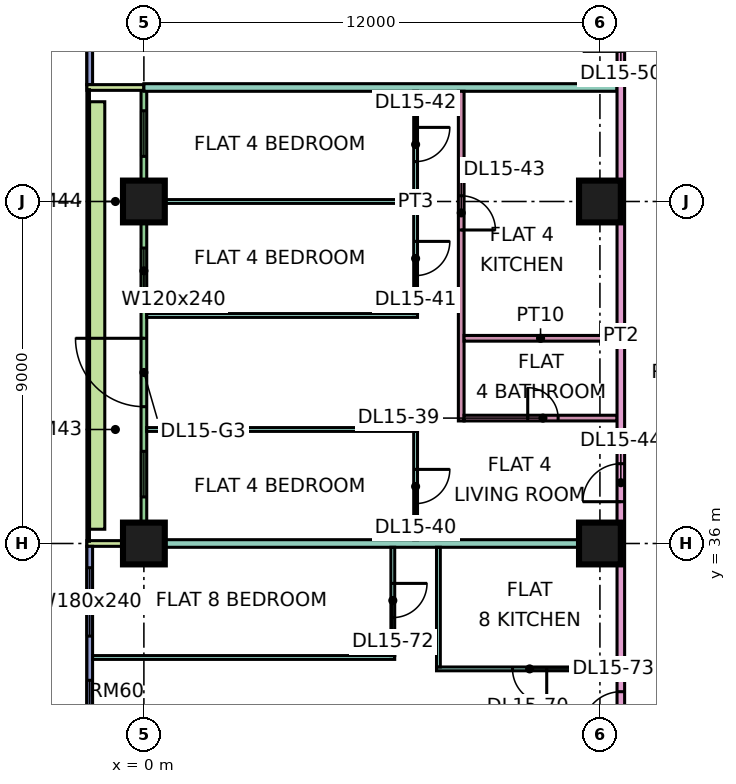
"""IFC4 building model, lengths in metres.
Left out: names, types, materials, properties, quantities, classifications, styles, units other than length and angle.
Written with IfcOpenShell. Run it as: python <this file> out.ifc"""

import sys

from ifc_helpers import new_model, si_unit, direction, frame, frame_2d, origin, origin_2d, place, context, subcontext, project, spatial, rectangle, extrude, element, fill, save


model = new_model("IFC4")
c1 = context("Model", 3, precision=1e-05, world=origin(), true_north=direction((0.0, 1.0)))
c2 = subcontext(c1, "Body", "Model", "MODEL_VIEW")
j1 = project(units=[si_unit("LENGTHUNIT", "METRE"), si_unit("PLANEANGLEUNIT", "RADIAN")], contexts=[c1])
p1 = place(None, origin())
s1 = spatial("IfcSite", under=j1, at=p1, CompositionType="ELEMENT")
p2 = place(p1, origin())
s2 = spatial("IfcBuilding", under=s1, at=p2, CompositionType="ELEMENT")
p3 = place(p2, frame((0.0, 0.0, 71.4)))
s3 = spatial("IfcBuildingStorey", under=s2, at=p3, CompositionType="ELEMENT", Elevation=71.4)
p4 = place(p3, frame((0.0, 36.0, 0.0), z_axis=(0.0, 0.0, 1.0), x_axis=(1.0, 0.0, 0.0)))
e1 = element("IfcColumn", 1, at=p4, inside=s3, PredefinedType="COLUMN", context=c2, shape_type="SweptSolid", body=[
    extrude(rectangle(XDim=1.1, YDim=1.1, at=origin_2d()), origin(), (0.0, 0.0, 1.0), 3.75),
])
for number, where, z_axis, x_axis in (
    (2, (0.0, 45.0, 0.0), (0.0, 0.0, 1.0), (1.0, 0.0, 0.0)),
    (3, (12.0, 36.0, 0.0), (0.0, 0.0, 1.0), (1.0, 0.0, 0.0)),
    (4, (12.0, 45.0, 0.0), (0.0, 0.0, 1.0), (1.0, 0.0, 0.0)),
):
    element("IfcColumn", number, at=place(p3, frame(where, z_axis=z_axis, x_axis=x_axis)), inside=s3, PredefinedType="COLUMN", context=c2, shape_type="SweptSolid", body=[
        extrude(rectangle(XDim=1.1, YDim=1.1, at=origin_2d()), origin(), (0.0, 0.0, 1.0), 3.75),
    ])
p5 = place(p3, frame((-1.425, 61.5, 0.0), z_axis=(0.0, 0.0, 1.0), x_axis=(0.0, -1.0, 0.0)))
e5 = element("IfcWall", 5, at=p5, inside=s3, PredefinedType="SOLIDWALL", context=c2, shape_type="SweptSolid", body=[
    extrude(rectangle(XDim=13.425, YDim=0.15, at=frame_2d((6.712, 0.0))), origin(), (0.0, 0.0, 1.0), 3.35),
])
p6 = place(p5, frame((0.3, 0.0, 0.45)))
e6 = element("IfcOpeningElement", 6, at=p6, cuts=e5, PredefinedType="OPENING", context=c2, shape_type="SweptSolid", body=[
    extrude(rectangle(XDim=0.9, YDim=2.4, at=frame_2d((0.45, 1.2))), frame((0.0, 0.085, 0.0), z_axis=(0.0, -1.0, 0.0), x_axis=(1.0, 0.0, 0.0)), (0.0, 0.0, 1.0), 0.17),
])
p7 = place(p5, frame((2.1, 0.0, 0.45)))
e7 = element("IfcOpeningElement", 7, at=p7, cuts=e5, PredefinedType="OPENING", context=c2, shape_type="SweptSolid", body=[
    extrude(rectangle(XDim=1.8, YDim=2.4, at=frame_2d((0.9, 1.2))), frame((0.0, 0.085, 0.0), z_axis=(0.0, -1.0, 0.0), x_axis=(1.0, 0.0, 0.0)), (0.0, 0.0, 1.0), 0.17),
])
p8 = place(p5, frame((5.1, 0.0, 0.45)))
e8 = element("IfcOpeningElement", 8, at=p8, cuts=e5, PredefinedType="OPENING", context=c2, shape_type="SweptSolid", body=[
    extrude(rectangle(XDim=1.8, YDim=2.4, at=frame_2d((0.9, 1.2))), frame((0.0, 0.085, 0.0), z_axis=(0.0, -1.0, 0.0), x_axis=(1.0, 0.0, 0.0)), (0.0, 0.0, 1.0), 0.17),
])
p9 = place(p5, frame((8.962, 0.0, 0.45)))
e9 = element("IfcOpeningElement", 9, at=p9, cuts=e5, PredefinedType="OPENING", context=c2, shape_type="SweptSolid", body=[
    extrude(rectangle(XDim=3.0, YDim=2.4, at=frame_2d((1.5, 1.2))), frame((0.0, 0.085, 0.0), z_axis=(0.0, -1.0, 0.0), x_axis=(1.0, 0.0, 0.0)), (0.0, 0.0, 1.0), 0.17),
])
p10 = place(p3, frame((0.0, 47.925, 0.0), z_axis=(0.0, 0.0, 1.0), x_axis=(0.0, -1.0, 0.0)))
e10 = element("IfcWall", 10, at=p10, inside=s3, PredefinedType="SOLIDWALL", context=c2, shape_type="SweptSolid", body=[
    extrude(rectangle(XDim=11.85, YDim=0.15, at=frame_2d((5.925, 0.0))), origin(), (0.0, 0.0, 1.0), 3.35),
])
p11 = place(p10, frame((0.538, 0.0, 0.45)))
e11 = element("IfcOpeningElement", 11, at=p11, cuts=e10, PredefinedType="OPENING", context=c2, shape_type="SweptSolid", body=[
    extrude(rectangle(XDim=1.2, YDim=2.4, at=frame_2d((0.6, 1.2))), frame((0.0, 0.085, 0.0), z_axis=(0.0, -1.0, 0.0), x_axis=(1.0, 0.0, 0.0)), (0.0, 0.0, 1.0), 0.17),
])
p12 = place(p10, frame((4.15, 0.0, 0.45)))
e12 = element("IfcOpeningElement", 12, at=p12, cuts=e10, PredefinedType="OPENING", context=c2, shape_type="SweptSolid", body=[
    extrude(rectangle(XDim=1.2, YDim=2.4, at=frame_2d((0.6, 1.2))), frame((0.0, 0.085, 0.0), z_axis=(0.0, -1.0, 0.0), x_axis=(1.0, 0.0, 0.0)), (0.0, 0.0, 1.0), 0.17),
])
p13 = place(p10, frame((6.525, 0.0, 0.0)))
e13 = element("IfcOpeningElement", 13, at=p13, cuts=e10, PredefinedType="OPENING", context=c2, shape_type="SweptSolid", body=[
    extrude(rectangle(XDim=1.8, YDim=2.4, at=frame_2d((0.9, 1.2))), frame((0.0, 0.085, 0.0), z_axis=(0.0, -1.0, 0.0), x_axis=(1.0, 0.0, 0.0)), (0.0, 0.0, 1.0), 0.17),
])
p14 = place(p10, frame((9.5, 0.0, 0.45)))
e14 = element("IfcOpeningElement", 14, at=p14, cuts=e10, PredefinedType="OPENING", context=c2, shape_type="SweptSolid", body=[
    extrude(rectangle(XDim=1.2, YDim=2.4, at=frame_2d((0.6, 1.2))), frame((0.0, 0.085, 0.0), z_axis=(0.0, -1.0, 0.0), x_axis=(1.0, 0.0, 0.0)), (0.0, 0.0, 1.0), 0.17),
])
for number, where, z_axis, x_axis in (
    (15, (-1.5, 48.0, 0.0), (0.0, 0.0, 1.0), (1.0, 0.0, 0.0)),
    (16, (-1.5, 36.0, 0.0), (0.0, 0.0, 1.0), (1.0, 0.0, 0.0)),
):
    element("IfcWall", number, at=place(p3, frame(where, z_axis=z_axis, x_axis=x_axis)), inside=s3, PredefinedType="SOLIDWALL", context=c2, shape_type="SweptSolid", body=[
        extrude(rectangle(XDim=1.5, YDim=0.15, at=frame_2d((0.75, 0.0))), origin(), (0.0, 0.0, 1.0), 3.35),
    ])
p15 = place(p3, frame((-1.425, 35.925, 0.0), z_axis=(0.0, 0.0, 1.0), x_axis=(0.0, -1.0, 0.0)))
e17 = element("IfcWall", 17, at=p15, inside=s3, PredefinedType="SOLIDWALL", context=c2, shape_type="SweptSolid", body=[
    extrude(rectangle(XDim=11.85, YDim=0.15, at=frame_2d((5.925, 0.0))), origin(), (0.0, 0.0, 1.0), 3.35),
])
p16 = place(p15, frame((0.562, 0.0, 0.45)))
e18 = element("IfcOpeningElement", 18, at=p16, cuts=e17, PredefinedType="OPENING", context=c2, shape_type="SweptSolid", body=[
    extrude(rectangle(XDim=1.8, YDim=2.4, at=frame_2d((0.9, 1.2))), frame((0.0, 0.085, 0.0), z_axis=(0.0, -1.0, 0.0), x_axis=(1.0, 0.0, 0.0)), (0.0, 0.0, 1.0), 0.17),
])
p17 = place(p15, frame((3.525, 0.0, 0.45)))
e19 = element("IfcOpeningElement", 19, at=p17, cuts=e17, PredefinedType="OPENING", context=c2, shape_type="SweptSolid", body=[
    extrude(rectangle(XDim=4.8, YDim=2.4, at=frame_2d((2.4, 1.2))), frame((0.0, 0.085, 0.0), z_axis=(0.0, -1.0, 0.0), x_axis=(1.0, 0.0, 0.0)), (0.0, 0.0, 1.0), 0.17),
])
p18 = place(p15, frame((9.488, 0.0, 0.45)))
e20 = element("IfcOpeningElement", 20, at=p18, cuts=e17, PredefinedType="OPENING", context=c2, shape_type="SweptSolid", body=[
    extrude(rectangle(XDim=1.8, YDim=2.4, at=frame_2d((0.9, 1.2))), frame((0.0, 0.085, 0.0), z_axis=(0.0, -1.0, 0.0), x_axis=(1.0, 0.0, 0.0)), (0.0, 0.0, 1.0), 0.17),
])
p19 = place(p3, frame((-1.229, 47.625, 0.0), z_axis=(0.0, 0.0, 1.0), x_axis=(0.0, -1.0, 0.0)))
e21 = element("IfcWall", 21, at=p19, inside=s3, PredefinedType="SOLIDWALL", context=c2, shape_type="SweptSolid", body=[
    extrude(rectangle(XDim=11.25, YDim=0.4, at=frame_2d((5.625, 0.0))), origin(), (0.0, 0.0, 1.0), 0.7),
])
p20 = place(p3, frame((-1.35, 33.0, 0.0), z_axis=(0.0, 0.0, 1.0), x_axis=(1.0, 0.0, 0.0)))
e22 = element("IfcWall", 22, at=p20, inside=s3, PredefinedType="PARTITIONING", context=c2, shape_type="SweptSolid", body=[
    extrude(rectangle(XDim=7.95, YDim=0.1, at=frame_2d((3.975, 0.0))), origin(), (0.0, 0.0, 1.0), 3.35),
])
e23 = element("IfcWall", 23, at=p4, inside=s3, PredefinedType="PARTITIONING", context=c2, shape_type="SweptSolid", body=[
    extrude(rectangle(XDim=12.45, YDim=0.2, at=frame_2d((6.225, 0.0))), origin(), (0.0, 0.0, 1.0), 3.35),
])
p21 = place(p3, frame((0.0, 48.0, 0.0), z_axis=(0.0, 0.0, 1.0), x_axis=(1.0, 0.0, 0.0)))
e24 = element("IfcWall", 24, at=p21, inside=s3, PredefinedType="PARTITIONING", context=c2, shape_type="SweptSolid", body=[
    extrude(rectangle(XDim=12.45, YDim=0.2, at=frame_2d((6.225, 0.0))), origin(), (0.0, 0.0, 1.0), 3.35),
])
for number, where, z_axis, x_axis in (
    (25, (0.074, 39.0, 0.0), (0.0, 0.0, 1.0), (1.0, 0.0, 0.0)),
    (26, (0.074, 42.0, 0.0), (0.0, 0.0, 1.0), (1.0, 0.0, 0.0)),
):
    element("IfcWall", number, at=place(p3, frame(where, z_axis=z_axis, x_axis=x_axis)), inside=s3, PredefinedType="PARTITIONING", context=c2, shape_type="SweptSolid", body=[
        extrude(rectangle(XDim=7.126, YDim=0.1, at=frame_2d((3.563, 0.0))), origin(), (0.0, 0.0, 1.0), 3.35),
    ])
p22 = place(p3, frame((0.074, 45.0, 0.0), z_axis=(0.0, 0.0, 1.0), x_axis=(1.0, 0.0, 0.0)))
e27 = element("IfcWall", 27, at=p22, inside=s3, PredefinedType="PARTITIONING", context=c2, shape_type="SweptSolid", body=[
    extrude(rectangle(XDim=7.026, YDim=0.1, at=frame_2d((3.513, 0.0))), origin(), (0.0, 0.0, 1.0), 3.35),
])
p23 = place(p3, frame((6.55, 33.05, 0.0), z_axis=(0.0, 0.0, 1.0), x_axis=(0.0, 1.0, 0.0)))
e28 = element("IfcWall", 28, at=p23, inside=s3, PredefinedType="PARTITIONING", context=c2, shape_type="SweptSolid", body=[
    extrude(rectangle(XDim=2.85, YDim=0.1, at=frame_2d((1.425, 0.0))), origin(), (0.0, 0.0, 1.0), 3.35),
])
p24 = place(p23, frame((1.0, 0.0, 0.0)))
e29 = element("IfcOpeningElement", 29, at=p24, cuts=e28, PredefinedType="OPENING", context=c2, shape_type="SweptSolid", body=[
    extrude(rectangle(XDim=0.9, YDim=2.1, at=frame_2d((0.45, 1.05))), frame((0.0, 0.06, 0.0), z_axis=(0.0, -1.0, 0.0), x_axis=(1.0, 0.0, 0.0)), (0.0, 0.0, 1.0), 0.12),
])
p25 = place(p3, frame((7.15, 36.1, 0.0), z_axis=(0.0, 0.0, 1.0), x_axis=(0.0, 1.0, 0.0)))
e30 = element("IfcWall", 30, at=p25, inside=s3, PredefinedType="PARTITIONING", context=c2, shape_type="SweptSolid", body=[
    extrude(rectangle(XDim=2.85, YDim=0.1, at=frame_2d((1.425, 0.0))), origin(), (0.0, 0.0, 1.0), 3.35),
])
p26 = place(p25, frame((0.95, 0.0, 0.0)))
e31 = element("IfcOpeningElement", 31, at=p26, cuts=e30, PredefinedType="OPENING", context=c2, shape_type="SweptSolid", body=[
    extrude(rectangle(XDim=0.9, YDim=2.1, at=frame_2d((0.45, 1.05))), frame((0.0, 0.06, 0.0), z_axis=(0.0, -1.0, 0.0), x_axis=(1.0, 0.0, 0.0)), (0.0, 0.0, 1.0), 0.12),
])
p27 = place(p3, frame((7.15, 42.05, 0.0), z_axis=(0.0, 0.0, 1.0), x_axis=(0.0, 1.0, 0.0)))
e32 = element("IfcWall", 32, at=p27, inside=s3, PredefinedType="PARTITIONING", context=c2, shape_type="SweptSolid", body=[
    extrude(rectangle(XDim=5.85, YDim=0.1, at=frame_2d((2.925, 0.0))), origin(), (0.0, 0.0, 1.0), 3.35),
])
p28 = place(p27, frame((1.0, 0.0, 0.0)))
e33 = element("IfcOpeningElement", 33, at=p28, cuts=e32, PredefinedType="OPENING", context=c2, shape_type="SweptSolid", body=[
    extrude(rectangle(XDim=0.9, YDim=2.1, at=frame_2d((0.45, 1.05))), frame((0.0, 0.06, 0.0), z_axis=(0.0, -1.0, 0.0), x_axis=(1.0, 0.0, 0.0)), (0.0, 0.0, 1.0), 0.12),
])
p29 = place(p27, frame((4.0, 0.0, 0.0)))
e34 = element("IfcOpeningElement", 34, at=p29, cuts=e32, PredefinedType="OPENING", context=c2, shape_type="SweptSolid", body=[
    extrude(rectangle(XDim=0.9, YDim=2.1, at=frame_2d((0.45, 1.05))), frame((0.0, 0.06, 0.0), z_axis=(0.0, -1.0, 0.0), x_axis=(1.0, 0.0, 0.0)), (0.0, 0.0, 1.0), 0.12),
])
p30 = place(p3, frame((7.7, 32.7, 0.0), z_axis=(0.0, 0.0, 1.0), x_axis=(1.0, 0.0, 0.0)))
e35 = element("IfcWall", 35, at=p30, inside=s3, PredefinedType="PARTITIONING", context=c2, shape_type="SweptSolid", body=[
    extrude(rectangle(XDim=4.75, YDim=0.1, at=frame_2d((2.375, 0.0))), origin(), (0.0, 0.0, 1.0), 3.35),
])
p31 = place(p30, frame((2.0, 0.0, 0.0)))
e36 = element("IfcOpeningElement", 36, at=p31, cuts=e35, PredefinedType="OPENING", context=c2, shape_type="SweptSolid", body=[
    extrude(rectangle(XDim=0.9, YDim=2.1, at=frame_2d((0.45, 1.05))), frame((0.0, 0.06, 0.0), z_axis=(0.0, -1.0, 0.0), x_axis=(1.0, 0.0, 0.0)), (0.0, 0.0, 1.0), 0.12),
])
p32 = place(p3, frame((7.75, 32.75, 0.0), z_axis=(0.0, 0.0, 1.0), x_axis=(0.0, 1.0, 0.0)))
e37 = element("IfcWall", 37, at=p32, inside=s3, PredefinedType="PARTITIONING", context=c2, shape_type="SweptSolid", body=[
    extrude(rectangle(XDim=3.15, YDim=0.1, at=frame_2d((1.575, 0.0))), origin(), (0.0, 0.0, 1.0), 3.35),
])
p33 = place(p3, frame((8.35, 39.225, 0.0), z_axis=(0.0, 0.0, 1.0), x_axis=(0.0, 1.0, 0.0)))
e38 = element("IfcWall", 38, at=p33, inside=s3, PredefinedType="PARTITIONING", context=c2, shape_type="SweptSolid", body=[
    extrude(rectangle(XDim=8.675, YDim=0.15, at=frame_2d((4.337, 0.0))), origin(), (0.0, 0.0, 1.0), 3.35),
])
p34 = place(p33, frame((5.025, 0.0, 0.0)))
e39 = element("IfcOpeningElement", 39, at=p34, cuts=e38, PredefinedType="OPENING", context=c2, shape_type="SweptSolid", body=[
    extrude(rectangle(XDim=0.9, YDim=2.1, at=frame_2d((0.45, 1.05))), frame((0.0, 0.085, 0.0), z_axis=(0.0, -1.0, 0.0), x_axis=(1.0, 0.0, 0.0)), (0.0, 0.0, 1.0), 0.17),
])
p35 = place(p3, frame((8.425, 39.3, 0.0), z_axis=(0.0, 0.0, 1.0), x_axis=(1.0, 0.0, 0.0)))
e40 = element("IfcWall", 40, at=p35, inside=s3, PredefinedType="PARTITIONING", context=c2, shape_type="SweptSolid", body=[
    extrude(rectangle(XDim=4.025, YDim=0.15, at=frame_2d((2.012, 0.0))), origin(), (0.0, 0.0, 1.0), 3.35),
])
p36 = place(p35, frame((1.675, 0.0, 0.0)))
e41 = element("IfcOpeningElement", 41, at=p36, cuts=e40, PredefinedType="OPENING", context=c2, shape_type="SweptSolid", body=[
    extrude(rectangle(XDim=0.8, YDim=2.1, at=frame_2d((0.4, 1.05))), frame((0.0, 0.085, 0.0), z_axis=(0.0, -1.0, 0.0), x_axis=(1.0, 0.0, 0.0)), (0.0, 0.0, 1.0), 0.17),
])
p37 = place(p3, frame((8.425, 41.4, 0.0), z_axis=(0.0, 0.0, 1.0), x_axis=(1.0, 0.0, 0.0)))
e42 = element("IfcWall", 42, at=p37, inside=s3, PredefinedType="PARTITIONING", context=c2, shape_type="SweptSolid", body=[
    extrude(rectangle(XDim=4.025, YDim=0.15, at=frame_2d((2.012, 0.0))), origin(), (0.0, 0.0, 1.0), 3.35),
])
p38 = place(p3, frame((12.55, 20.0, 0.0), z_axis=(0.0, 0.0, 1.0), x_axis=(0.0, 1.0, 0.0)))
e43 = element("IfcWall", 43, at=p38, inside=s3, PredefinedType="PARTITIONING", context=c2, shape_type="SweptSolid", body=[
    extrude(rectangle(XDim=42.926, YDim=0.2, at=frame_2d((21.463, 0.0))), origin(), (0.0, 0.0, 1.0), 3.35),
])
p39 = place(p38, frame((17.1, 0.0, 0.0)))
e44 = element("IfcOpeningElement", 44, at=p39, cuts=e43, PredefinedType="OPENING", context=c2, shape_type="SweptSolid", body=[
    extrude(rectangle(XDim=1.0, YDim=2.1, at=frame_2d((0.5, 1.05))), frame((0.0, 0.11, 0.0), z_axis=(0.0, -1.0, 0.0), x_axis=(1.0, 0.0, 0.0)), (0.0, 0.0, 1.0), 0.22),
])
p40 = place(p38, frame((28.95, 0.0, 0.0)))
e45 = element("IfcOpeningElement", 45, at=p40, cuts=e43, PredefinedType="OPENING", context=c2, shape_type="SweptSolid", body=[
    extrude(rectangle(XDim=1.0, YDim=2.1, at=frame_2d((0.5, 1.05))), frame((0.0, 0.11, 0.0), z_axis=(0.0, -1.0, 0.0), x_axis=(1.0, 0.0, 0.0)), (0.0, 0.0, 1.0), 0.22),
])
p41 = place(p38, frame((0.6, 0.0, 0.0)))
e46 = element("IfcOpeningElement", 46, at=p41, cuts=e43, PredefinedType="OPENING", context=c2, shape_type="SweptSolid", body=[
    extrude(rectangle(XDim=1.2, YDim=2.1, at=frame_2d((0.6, 1.05))), frame((0.0, 0.11, 0.0), z_axis=(0.0, -1.0, 0.0), x_axis=(1.0, 0.0, 0.0)), (0.0, 0.0, 1.0), 0.22),
])
p42 = place(p38, frame((11.1, 0.0, 0.0)))
e47 = element("IfcOpeningElement", 47, at=p42, cuts=e43, PredefinedType="OPENING", context=c2, shape_type="SweptSolid", body=[
    extrude(rectangle(XDim=1.0, YDim=2.1, at=frame_2d((0.5, 1.05))), frame((0.0, 0.11, 0.0), z_axis=(0.0, -1.0, 0.0), x_axis=(1.0, 0.0, 0.0)), (0.0, 0.0, 1.0), 0.22),
])
p43 = place(p11, origin())
e48 = element("IfcWindow", 48, at=p43, inside=s3, PartitioningType="SINGLE_PANEL", PredefinedType="WINDOW", context=c2, shape_type="SweptSolid", body=[
    extrude(rectangle(XDim=1.2, YDim=2.4, at=frame_2d((0.6, 1.2))), frame((0.0, 0.03, 0.0), z_axis=(0.0, -1.0, 0.0), x_axis=(1.0, 0.0, 0.0)), (0.0, 0.0, 1.0), 0.06),
])
fill(e11, e48)
p44 = place(p12, origin())
e49 = element("IfcWindow", 49, at=p44, inside=s3, PartitioningType="SINGLE_PANEL", PredefinedType="WINDOW", context=c2, shape_type="SweptSolid", body=[
    extrude(rectangle(XDim=1.2, YDim=2.4, at=frame_2d((0.6, 1.2))), frame((0.0, 0.03, 0.0), z_axis=(0.0, -1.0, 0.0), x_axis=(1.0, 0.0, 0.0)), (0.0, 0.0, 1.0), 0.06),
])
fill(e12, e49)
p45 = place(p13, frame((1.8, 0.0, 0.0), z_axis=(0.0, 0.0, 1.0), x_axis=(-1.0, 0.0, 0.0)))
e50 = element("IfcDoor", 50, at=p45, inside=s3, OperationType="DOUBLE_DOOR_SINGLE_SWING", PredefinedType="DOOR", context=c2, shape_type="SweptSolid", body=[
    extrude(rectangle(XDim=1.8, YDim=2.4, at=frame_2d((0.9, 1.2))), frame((0.0, 0.025, 0.0), z_axis=(0.0, -1.0, 0.0), x_axis=(1.0, 0.0, 0.0)), (0.0, 0.0, 1.0), 0.05),
])
fill(e13, e50)
p46 = place(p14, origin())
e51 = element("IfcWindow", 51, at=p46, inside=s3, PartitioningType="SINGLE_PANEL", PredefinedType="WINDOW", context=c2, shape_type="SweptSolid", body=[
    extrude(rectangle(XDim=1.2, YDim=2.4, at=frame_2d((0.6, 1.2))), frame((0.0, 0.03, 0.0), z_axis=(0.0, -1.0, 0.0), x_axis=(1.0, 0.0, 0.0)), (0.0, 0.0, 1.0), 0.06),
])
fill(e14, e51)
p47 = place(p16, origin())
e52 = element("IfcWindow", 52, at=p47, inside=s3, PartitioningType="SINGLE_PANEL", PredefinedType="WINDOW", context=c2, shape_type="SweptSolid", body=[
    extrude(rectangle(XDim=1.8, YDim=2.4, at=frame_2d((0.9, 1.2))), frame((0.0, 0.03, 0.0), z_axis=(0.0, -1.0, 0.0), x_axis=(1.0, 0.0, 0.0)), (0.0, 0.0, 1.0), 0.06),
])
fill(e18, e52)
p48 = place(p17, origin())
e53 = element("IfcWindow", 53, at=p48, inside=s3, PartitioningType="SINGLE_PANEL", PredefinedType="WINDOW", context=c2, shape_type="SweptSolid", body=[
    extrude(rectangle(XDim=4.8, YDim=2.4, at=frame_2d((2.4, 1.2))), frame((0.0, 0.03, 0.0), z_axis=(0.0, -1.0, 0.0), x_axis=(1.0, 0.0, 0.0)), (0.0, 0.0, 1.0), 0.06),
])
fill(e19, e53)
p49 = place(p36, origin())
e54 = element("IfcDoor", 54, at=p49, inside=s3, OperationType="SINGLE_SWING_LEFT", PredefinedType="DOOR", context=c2, shape_type="SweptSolid", body=[
    extrude(rectangle(XDim=0.8, YDim=2.1, at=frame_2d((0.4, 1.05))), frame((0.0, 0.025, 0.0), z_axis=(0.0, -1.0, 0.0), x_axis=(1.0, 0.0, 0.0)), (0.0, 0.0, 1.0), 0.05),
])
fill(e41, e54)
p50 = place(p26, origin())
e55 = element("IfcDoor", 55, at=p50, inside=s3, OperationType="SINGLE_SWING_RIGHT", PredefinedType="DOOR", context=c2, shape_type="SweptSolid", body=[
    extrude(rectangle(XDim=0.9, YDim=2.1, at=frame_2d((0.45, 1.05))), frame((0.0, 0.025, 0.0), z_axis=(0.0, -1.0, 0.0), x_axis=(1.0, 0.0, 0.0)), (0.0, 0.0, 1.0), 0.05),
])
fill(e31, e55)
p51 = place(p28, origin())
e56 = element("IfcDoor", 56, at=p51, inside=s3, OperationType="SINGLE_SWING_RIGHT", PredefinedType="DOOR", context=c2, shape_type="SweptSolid", body=[
    extrude(rectangle(XDim=0.9, YDim=2.1, at=frame_2d((0.45, 1.05))), frame((0.0, 0.025, 0.0), z_axis=(0.0, -1.0, 0.0), x_axis=(1.0, 0.0, 0.0)), (0.0, 0.0, 1.0), 0.05),
])
fill(e33, e56)
p52 = place(p29, origin())
e57 = element("IfcDoor", 57, at=p52, inside=s3, OperationType="SINGLE_SWING_RIGHT", PredefinedType="DOOR", context=c2, shape_type="SweptSolid", body=[
    extrude(rectangle(XDim=0.9, YDim=2.1, at=frame_2d((0.45, 1.05))), frame((0.0, 0.025, 0.0), z_axis=(0.0, -1.0, 0.0), x_axis=(1.0, 0.0, 0.0)), (0.0, 0.0, 1.0), 0.05),
])
fill(e34, e57)
p53 = place(p34, frame((0.9, 0.0, 0.0), z_axis=(0.0, 0.0, 1.0), x_axis=(-1.0, 0.0, 0.0)))
e58 = element("IfcDoor", 58, at=p53, inside=s3, OperationType="SINGLE_SWING_LEFT", PredefinedType="DOOR", context=c2, shape_type="SweptSolid", body=[
    extrude(rectangle(XDim=0.9, YDim=2.1, at=frame_2d((0.45, 1.05))), frame((0.0, 0.025, 0.0), z_axis=(0.0, -1.0, 0.0), x_axis=(1.0, 0.0, 0.0)), (0.0, 0.0, 1.0), 0.05),
])
fill(e39, e58)
p54 = place(p39, origin())
e59 = element("IfcDoor", 59, at=p54, inside=s3, OperationType="SINGLE_SWING_LEFT", PredefinedType="DOOR", context=c2, shape_type="SweptSolid", body=[
    extrude(rectangle(XDim=1.0, YDim=2.1, at=frame_2d((0.5, 1.05))), frame((0.0, 0.025, 0.0), z_axis=(0.0, -1.0, 0.0), x_axis=(1.0, 0.0, 0.0)), (0.0, 0.0, 1.0), 0.05),
])
fill(e44, e59)
p55 = place(p24, origin())
e60 = element("IfcDoor", 60, at=p55, inside=s3, OperationType="SINGLE_SWING_RIGHT", PredefinedType="DOOR", context=c2, shape_type="SweptSolid", body=[
    extrude(rectangle(XDim=0.9, YDim=2.1, at=frame_2d((0.45, 1.05))), frame((0.0, 0.025, 0.0), z_axis=(0.0, -1.0, 0.0), x_axis=(1.0, 0.0, 0.0)), (0.0, 0.0, 1.0), 0.05),
])
fill(e29, e60)
p56 = place(p31, origin())
e61 = element("IfcDoor", 61, at=p56, inside=s3, OperationType="SINGLE_SWING_RIGHT", PredefinedType="DOOR", context=c2, shape_type="SweptSolid", body=[
    extrude(rectangle(XDim=0.9, YDim=2.1, at=frame_2d((0.45, 1.05))), frame((0.0, 0.025, 0.0), z_axis=(0.0, -1.0, 0.0), x_axis=(1.0, 0.0, 0.0)), (0.0, 0.0, 1.0), 0.05),
])
fill(e36, e61)
p57 = place(p42, origin())
e62 = element("IfcDoor", 62, at=p57, inside=s3, OperationType="SINGLE_SWING_LEFT", PredefinedType="DOOR", context=c2, shape_type="SweptSolid", body=[
    extrude(rectangle(XDim=1.0, YDim=2.1, at=frame_2d((0.5, 1.05))), frame((0.0, 0.025, 0.0), z_axis=(0.0, -1.0, 0.0), x_axis=(1.0, 0.0, 0.0)), (0.0, 0.0, 1.0), 0.05),
])
fill(e47, e62)
save(model, sys.argv[1])
